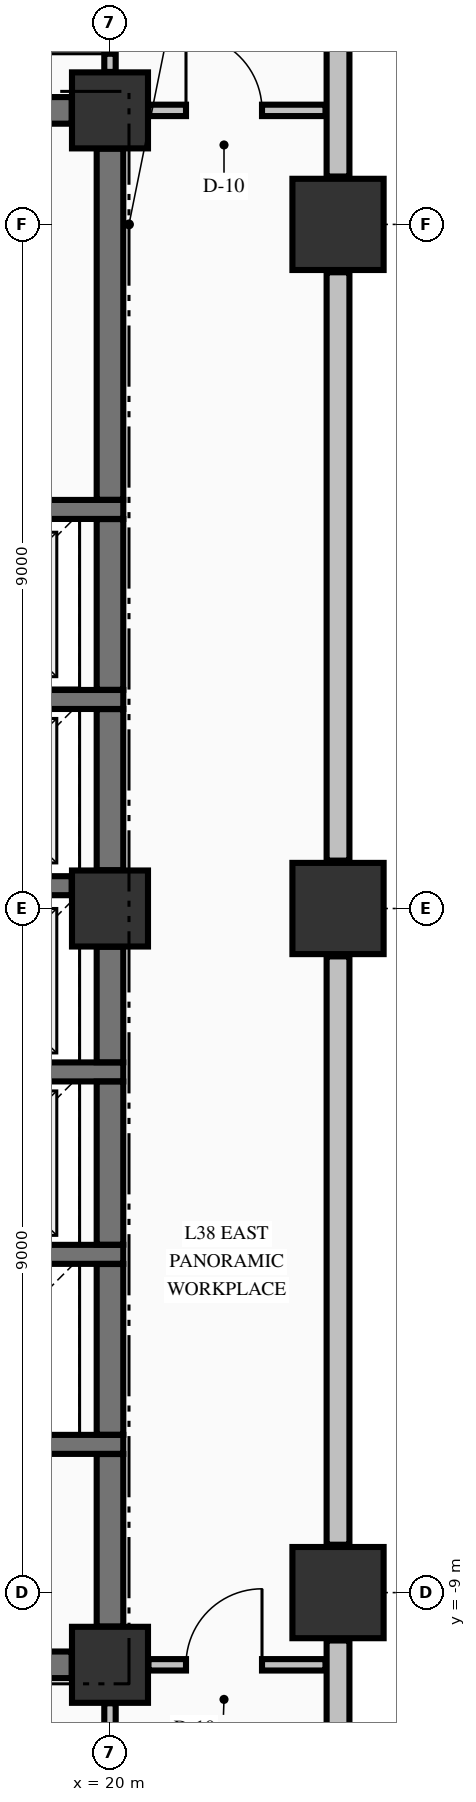
"""IFC4 building model, lengths in metres.
Left out: names, types, materials, properties, quantities, classifications, styles, units other than length and angle.
Written with IfcOpenShell. Run it as: python <this file> out.ifc"""

import sys

from ifc_helpers import new_model, si_unit, direction, frame, frame_2d, origin, origin_2d, place, context, subcontext, project, spatial, rectangle, extrude, element, fill, save


model = new_model("IFC4")
c1 = context("Model", 3, precision=1e-05, world=origin(), true_north=direction((0.0, 1.0)))
c2 = subcontext(c1, "Body", "Model", "MODEL_VIEW")
j1 = project(units=[si_unit("LENGTHUNIT", "METRE"), si_unit("PLANEANGLEUNIT", "RADIAN")], contexts=[c1])
p1 = place(None, origin())
s1 = spatial("IfcSite", under=j1, at=p1, CompositionType="ELEMENT")
p2 = place(p1, origin())
s2 = spatial("IfcBuilding", under=s1, at=p2, CompositionType="ELEMENT")
p3 = place(p2, frame((0.0, 0.0, 149.91)))
s3 = spatial("IfcBuildingStorey", under=s2, at=p3, CompositionType="ELEMENT", Elevation=149.91)
for number, where, z_axis, x_axis in (
    (1, (23.0, -9.0, -0.25), (0.0, 0.0, 1.0), (1.0, 0.0, 0.0)),
    (2, (23.0, 0.0, -0.25), (0.0, 0.0, 1.0), (1.0, 0.0, 0.0)),
    (3, (23.0, 9.0, -0.25), (0.0, 0.0, 1.0), (1.0, 0.0, 0.0)),
):
    element("IfcColumn", number, at=place(p3, frame(where, z_axis=z_axis, x_axis=x_axis)), inside=s3, PredefinedType="COLUMN", context=c2, shape_type="SweptSolid", body=[
        extrude(rectangle(XDim=1.2, YDim=1.2, at=origin_2d()), origin(), (0.0, 0.0, 1.0), 3.395),
    ])
for number, where, z_axis, x_axis in (
    (4, (20.0, -9.95, -0.25), (0.0, 0.0, 1.0), (1.0, 0.0, 0.0)),
    (5, (20.0, 10.5, -0.25), (0.0, 0.0, 1.0), (1.0, 0.0, 0.0)),
    (6, (20.0, 0.0, -0.25), (0.0, 0.0, 1.0), (1.0, 0.0, 0.0)),
):
    element("IfcColumn", number, at=place(p3, frame(where, z_axis=z_axis, x_axis=x_axis)), inside=s3, PredefinedType="COLUMN", context=c2, shape_type="SweptSolid", body=[
        extrude(rectangle(XDim=1.0, YDim=1.0, at=origin_2d()), origin(), (0.0, 0.0, 1.0), 3.395),
    ])
p4 = place(p3, frame((23.0, -20.37, 0.0), z_axis=(0.0, 0.0, 1.0), x_axis=(0.0, 1.0, 0.0)))
e7 = element("IfcWall", 7, at=p4, inside=s3, PredefinedType="STANDARD", context=c2, shape_type="SweptSolid", body=[
    extrude(rectangle(XDim=10.74, YDim=0.3, at=frame_2d((5.37, 0.0))), origin(), (0.0, 0.0, 1.0), 2.537),
])
for number, where, z_axis, x_axis in (
    (8, (23.0, -8.37, 0.0), (0.0, 0.0, 1.0), (0.0, 1.0, 0.0)),
    (9, (23.0, 0.63, 0.0), (0.0, 0.0, 1.0), (0.0, 1.0, 0.0)),
):
    element("IfcWall", number, at=place(p3, frame(where, z_axis=z_axis, x_axis=x_axis)), inside=s3, PredefinedType="STANDARD", context=c2, shape_type="SweptSolid", body=[
        extrude(rectangle(XDim=7.74, YDim=0.3, at=frame_2d((3.87, 0.0))), origin(), (0.0, 0.0, 1.0), 2.537),
    ])
p5 = place(p3, frame((23.0, 9.63, 0.0), z_axis=(0.0, 0.0, 1.0), x_axis=(0.0, 1.0, 0.0)))
e10 = element("IfcWall", 10, at=p5, inside=s3, PredefinedType="STANDARD", context=c2, shape_type="SweptSolid", body=[
    extrude(rectangle(XDim=10.74, YDim=0.3, at=frame_2d((5.37, 0.0))), origin(), (0.0, 0.0, 1.0), 2.537),
])
p6 = place(p3, frame((14.7, -9.95, 0.0), z_axis=(0.0, 0.0, 1.0), x_axis=(1.0, 0.0, 0.0)))
e11 = element("IfcWall", 11, at=p6, inside=s3, PredefinedType="SHEAR", context=c2, shape_type="SweptSolid", body=[
    extrude(rectangle(XDim=4.796, YDim=0.35, at=frame_2d((2.398, 0.0))), origin(), (0.0, 0.0, 1.0), 3.145),
])
p7 = place(p6, frame((0.65, 0.0, 0.0)))
e12 = element("IfcOpeningElement", 12, at=p7, cuts=e11, PredefinedType="OPENING", context=c2, shape_type="SweptSolid", body=[
    extrude(rectangle(XDim=1.2, YDim=2.15, at=frame_2d((0.6, 1.075))), frame((0.0, 0.185, 0.0), z_axis=(0.0, -1.0, 0.0), x_axis=(1.0, 0.0, 0.0)), (0.0, 0.0, 1.0), 0.37),
])
for number, where, z_axis, x_axis in (
    (13, (17.025, -7.05, 0.0), (0.0, 0.0, 1.0), (1.0, 0.0, 0.0)),
    (14, (17.025, -4.55, 0.0), (0.0, 0.0, 1.0), (1.0, 0.0, 0.0)),
    (15, (17.025, -2.15, 0.0), (0.0, 0.0, 1.0), (1.0, 0.0, 0.0)),
):
    element("IfcWall", number, at=place(p3, frame(where, z_axis=z_axis, x_axis=x_axis)), inside=s3, PredefinedType="SOLIDWALL", context=c2, shape_type="SweptSolid", body=[
        extrude(rectangle(XDim=3.15, YDim=0.25, at=frame_2d((1.575, 0.0))), origin(), (0.0, 0.0, 1.0), 3.145),
    ])
p8 = place(p3, frame((17.025, 0.3, 0.0), z_axis=(0.0, 0.0, 1.0), x_axis=(1.0, 0.0, 0.0)))
e16 = element("IfcWall", 16, at=p8, inside=s3, PredefinedType="SOLIDWALL", context=c2, shape_type="SweptSolid", body=[
    extrude(rectangle(XDim=2.471, YDim=0.25, at=frame_2d((1.236, 0.0))), origin(), (0.0, 0.0, 1.0), 3.145),
])
for number, where, z_axis, x_axis in (
    (17, (17.025, 2.75, 0.0), (0.0, 0.0, 1.0), (1.0, 0.0, 0.0)),
    (18, (17.025, 5.25, 0.0), (0.0, 0.0, 1.0), (1.0, 0.0, 0.0)),
):
    element("IfcWall", number, at=place(p3, frame(where, z_axis=z_axis, x_axis=x_axis)), inside=s3, PredefinedType="SOLIDWALL", context=c2, shape_type="SweptSolid", body=[
        extrude(rectangle(XDim=3.15, YDim=0.25, at=frame_2d((1.575, 0.0))), origin(), (0.0, 0.0, 1.0), 3.145),
    ])
p9 = place(p3, frame((14.7, 10.5, 0.0), z_axis=(0.0, 0.0, 1.0), x_axis=(1.0, 0.0, 0.0)))
e19 = element("IfcWall", 19, at=p9, inside=s3, PredefinedType="SHEAR", context=c2, shape_type="SweptSolid", body=[
    extrude(rectangle(XDim=4.796, YDim=0.35, at=frame_2d((2.398, 0.0))), origin(), (0.0, 0.0, 1.0), 3.145),
])
p10 = place(p9, frame((0.65, 0.0, 0.0)))
e20 = element("IfcOpeningElement", 20, at=p10, cuts=e19, PredefinedType="OPENING", context=c2, shape_type="SweptSolid", body=[
    extrude(rectangle(XDim=1.2, YDim=2.15, at=frame_2d((0.6, 1.075))), frame((0.0, 0.185, 0.0), z_axis=(0.0, -1.0, 0.0), x_axis=(1.0, 0.0, 0.0)), (0.0, 0.0, 1.0), 0.37),
])
p11 = place(p9, frame((3.25, 0.0, 0.0)))
e21 = element("IfcOpeningElement", 21, at=p11, cuts=e19, PredefinedType="OPENING", context=c2, shape_type="SweptSolid", body=[
    extrude(rectangle(XDim=0.9, YDim=2.15, at=frame_2d((0.45, 1.075))), frame((0.0, 0.185, 0.0), z_axis=(0.0, -1.0, 0.0), x_axis=(1.0, 0.0, 0.0)), (0.0, 0.0, 1.0), 0.37),
])
p12 = place(p3, frame((20.506, -9.95, 0.0), z_axis=(0.0, 0.0, 1.0), x_axis=(1.0, 0.0, 0.0)))
e22 = element("IfcWall", 22, at=p12, inside=s3, PredefinedType="PARTITIONING", context=c2, shape_type="SweptSolid", body=[
    extrude(rectangle(XDim=2.329, YDim=0.15, at=frame_2d((1.165, 0.0))), origin(), (0.0, 0.0, 1.0), 3.145),
])
p13 = place(p12, frame((0.494, 0.0, 0.0)))
e23 = element("IfcOpeningElement", 23, at=p13, cuts=e22, PredefinedType="OPENING", context=c2, shape_type="SweptSolid", body=[
    extrude(rectangle(XDim=1.0, YDim=2.15, at=frame_2d((0.5, 1.075))), frame((0.0, 0.085, 0.0), z_axis=(0.0, -1.0, 0.0), x_axis=(1.0, 0.0, 0.0)), (0.0, 0.0, 1.0), 0.17),
])
p14 = place(p3, frame((20.506, 10.5, 0.0), z_axis=(0.0, 0.0, 1.0), x_axis=(1.0, 0.0, 0.0)))
e24 = element("IfcWall", 24, at=p14, inside=s3, PredefinedType="PARTITIONING", context=c2, shape_type="SweptSolid", body=[
    extrude(rectangle(XDim=2.329, YDim=0.15, at=frame_2d((1.165, 0.0))), origin(), (0.0, 0.0, 1.0), 3.145),
])
p15 = place(p14, frame((0.494, 0.0, 0.0)))
e25 = element("IfcOpeningElement", 25, at=p15, cuts=e24, PredefinedType="OPENING", context=c2, shape_type="SweptSolid", body=[
    extrude(rectangle(XDim=1.0, YDim=2.15, at=frame_2d((0.5, 1.075))), frame((0.0, 0.085, 0.0), z_axis=(0.0, -1.0, 0.0), x_axis=(1.0, 0.0, 0.0)), (0.0, 0.0, 1.0), 0.17),
])
p16 = place(p3, frame((20.0, -9.446, 0.0), z_axis=(0.0, 0.0, 1.0), x_axis=(0.0, 1.0, 0.0)))
e26 = element("IfcWall", 26, at=p16, inside=s3, PredefinedType="SHEAR", context=c2, shape_type="SweptSolid", body=[
    extrude(rectangle(XDim=2.269, YDim=0.35, at=frame_2d((1.135, 0.0))), origin(), (0.0, 0.0, 1.0), 3.145),
])
p17 = place(p3, frame((20.0, -6.923, 0.0), z_axis=(0.0, 0.0, 1.0), x_axis=(0.0, 1.0, 0.0)))
e27 = element("IfcWall", 27, at=p17, inside=s3, PredefinedType="SHEAR", context=c2, shape_type="SweptSolid", body=[
    extrude(rectangle(XDim=2.246, YDim=0.35, at=frame_2d((1.123, 0.0))), origin(), (0.0, 0.0, 1.0), 3.145),
])
p18 = place(p3, frame((20.0, -4.423, 0.0), z_axis=(0.0, 0.0, 1.0), x_axis=(0.0, 1.0, 0.0)))
e28 = element("IfcWall", 28, at=p18, inside=s3, PredefinedType="SHEAR", context=c2, shape_type="SweptSolid", body=[
    extrude(rectangle(XDim=2.146, YDim=0.35, at=frame_2d((1.073, 0.0))), origin(), (0.0, 0.0, 1.0), 3.145),
])
p19 = place(p3, frame((20.0, -2.023, 0.0), z_axis=(0.0, 0.0, 1.0), x_axis=(0.0, 1.0, 0.0)))
e29 = element("IfcWall", 29, at=p19, inside=s3, PredefinedType="SHEAR", context=c2, shape_type="SweptSolid", body=[
    extrude(rectangle(XDim=1.519, YDim=0.35, at=frame_2d((0.76, 0.0))), origin(), (0.0, 0.0, 1.0), 3.145),
])
p20 = place(p3, frame((20.0, 0.504, 0.0), z_axis=(0.0, 0.0, 1.0), x_axis=(0.0, 1.0, 0.0)))
e30 = element("IfcWall", 30, at=p20, inside=s3, PredefinedType="SHEAR", context=c2, shape_type="SweptSolid", body=[
    extrude(rectangle(XDim=2.119, YDim=0.35, at=frame_2d((1.06, 0.0))), origin(), (0.0, 0.0, 1.0), 3.145),
])
p21 = place(p3, frame((20.0, 2.877, 0.0), z_axis=(0.0, 0.0, 1.0), x_axis=(0.0, 1.0, 0.0)))
e31 = element("IfcWall", 31, at=p21, inside=s3, PredefinedType="SHEAR", context=c2, shape_type="SweptSolid", body=[
    extrude(rectangle(XDim=2.246, YDim=0.35, at=frame_2d((1.123, 0.0))), origin(), (0.0, 0.0, 1.0), 3.145),
])
p22 = place(p3, frame((20.0, 5.377, 0.0), z_axis=(0.0, 0.0, 1.0), x_axis=(0.0, 1.0, 0.0)))
e32 = element("IfcWall", 32, at=p22, inside=s3, PredefinedType="SHEAR", context=c2, shape_type="SweptSolid", body=[
    extrude(rectangle(XDim=4.619, YDim=0.35, at=frame_2d((2.31, 0.0))), origin(), (0.0, 0.0, 1.0), 3.145),
])
p23 = place(p3, frame((20.0, -13.022, 0.0), z_axis=(0.0, 0.0, 1.0), x_axis=(0.0, 1.0, 0.0)))
e33 = element("IfcWall", 33, at=p23, inside=s3, PredefinedType="PARTITIONING", context=c2, shape_type="SweptSolid", body=[
    extrude(rectangle(XDim=2.566, YDim=0.15, at=frame_2d((1.283, 0.0))), origin(), (0.0, 0.0, 1.0), 2.635),
])
p24 = place(p23, frame((1.027, 0.0, 0.0)))
e34 = element("IfcOpeningElement", 34, at=p24, cuts=e33, PredefinedType="OPENING", context=c2, shape_type="SweptSolid", body=[
    extrude(rectangle(XDim=0.95, YDim=2.15, at=frame_2d((0.475, 1.075))), frame((0.0, 0.085, 0.0), z_axis=(0.0, -1.0, 0.0), x_axis=(1.0, 0.0, 0.0)), (0.0, 0.0, 1.0), 0.17),
])
p25 = place(p3, frame((20.0, 11.006, 0.0), z_axis=(0.0, 0.0, 1.0), x_axis=(0.0, 1.0, 0.0)))
e35 = element("IfcWall", 35, at=p25, inside=s3, PredefinedType="PARTITIONING", context=c2, shape_type="SweptSolid", body=[
    extrude(rectangle(XDim=1.866, YDim=0.15, at=frame_2d((0.933, 0.0))), origin(), (0.0, 0.0, 1.0), 2.635),
])
p26 = place(p25, frame((0.239, 0.0, 0.0)))
e36 = element("IfcOpeningElement", 36, at=p26, cuts=e35, PredefinedType="OPENING", context=c2, shape_type="SweptSolid", body=[
    extrude(rectangle(XDim=0.95, YDim=2.15, at=frame_2d((0.475, 1.075))), frame((0.0, 0.085, 0.0), z_axis=(0.0, -1.0, 0.0), x_axis=(1.0, 0.0, 0.0)), (0.0, 0.0, 1.0), 0.17),
])
p27 = place(p26, origin())
e37 = element("IfcDoor", 37, at=p27, inside=s3, OperationType="SINGLE_SWING_LEFT", PredefinedType="DOOR", context=c2, shape_type="SweptSolid", body=[
    extrude(rectangle(XDim=0.95, YDim=2.15, at=frame_2d((0.475, 1.075))), frame((0.0, 0.025, 0.0), z_axis=(0.0, -1.0, 0.0), x_axis=(1.0, 0.0, 0.0)), (0.0, 0.0, 1.0), 0.05),
])
fill(e36, e37)
p28 = place(p15, origin())
e38 = element("IfcDoor", 38, at=p28, inside=s3, OperationType="SINGLE_SWING_LEFT", PredefinedType="DOOR", context=c2, shape_type="SweptSolid", body=[
    extrude(rectangle(XDim=1.0, YDim=2.15, at=frame_2d((0.5, 1.075))), frame((0.0, 0.025, 0.0), z_axis=(0.0, -1.0, 0.0), x_axis=(1.0, 0.0, 0.0)), (0.0, 0.0, 1.0), 0.05),
])
fill(e25, e38)
p29 = place(p13, origin())
e39 = element("IfcDoor", 39, at=p29, inside=s3, OperationType="SINGLE_SWING_RIGHT", PredefinedType="DOOR", context=c2, shape_type="SweptSolid", body=[
    extrude(rectangle(XDim=1.0, YDim=2.15, at=frame_2d((0.5, 1.075))), frame((0.0, 0.025, 0.0), z_axis=(0.0, -1.0, 0.0), x_axis=(1.0, 0.0, 0.0)), (0.0, 0.0, 1.0), 0.05),
])
fill(e23, e39)
save(model, sys.argv[1])
